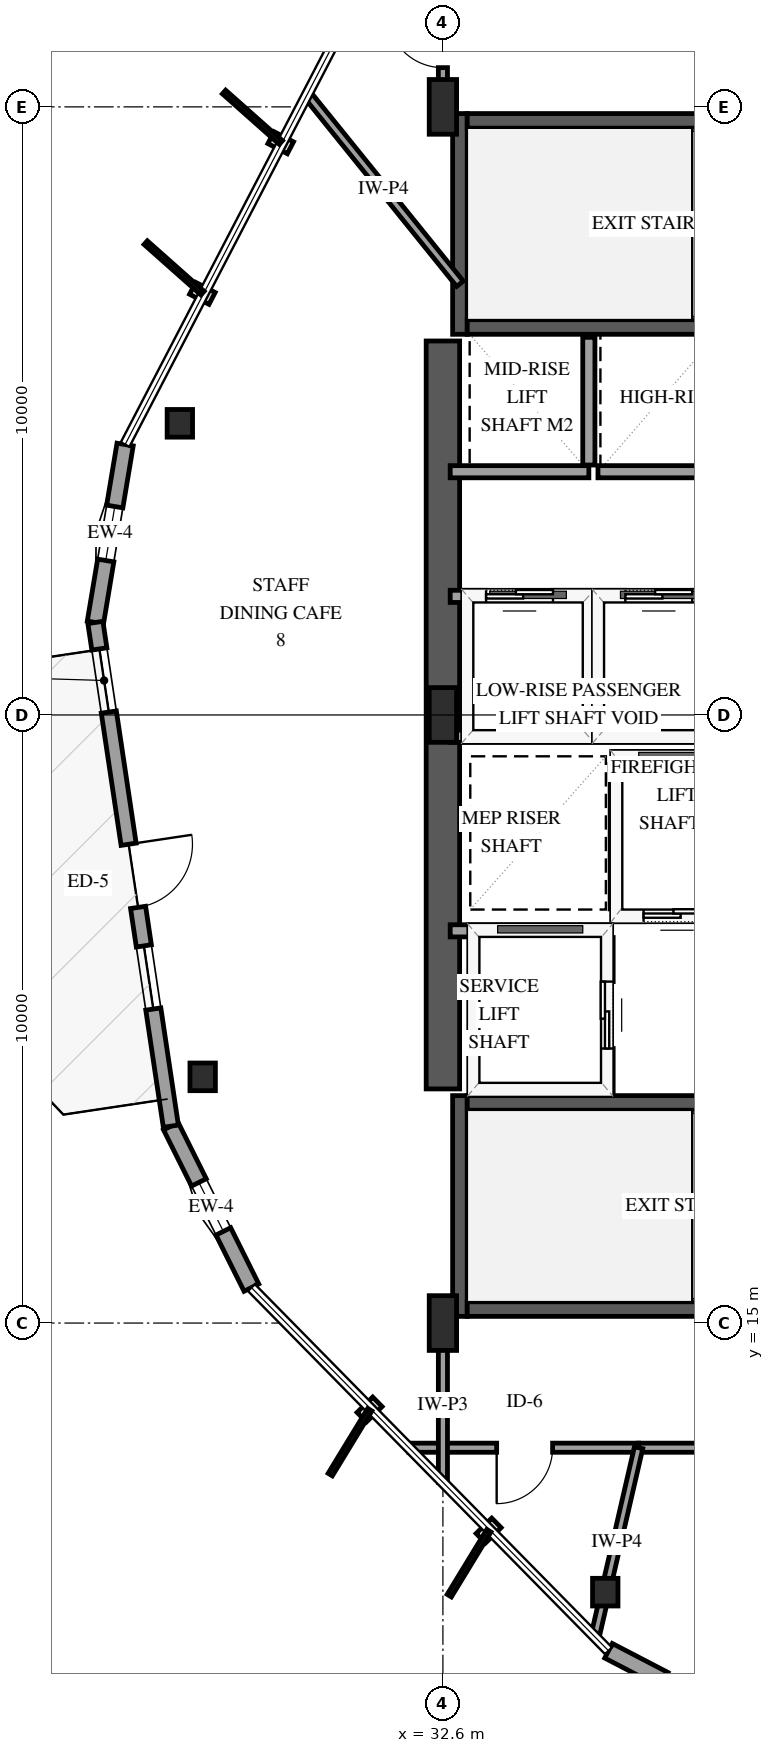
"""IFC4 building model, lengths in metres.
Left out: names, types, materials, properties, quantities, classifications, styles, units other than length and angle.
Written with IfcOpenShell. Run it as: python <this file> out.ifc"""

import sys

from ifc_helpers import new_model, si_unit, direction, frame, frame_2d, origin, origin_2d, place, context, subcontext, project, spatial, rectangle, i_section, extrude, element, fill, save


model = new_model("IFC4")
c1 = context("Model", 3, precision=1e-05, world=origin(), true_north=direction((0.0, 1.0)))
c2 = subcontext(c1, "Body", "Model", "MODEL_VIEW")
j1 = project(units=[si_unit("LENGTHUNIT", "METRE"), si_unit("PLANEANGLEUNIT", "RADIAN")], contexts=[c1])
p1 = place(None, origin())
s1 = spatial("IfcSite", under=j1, at=p1, CompositionType="ELEMENT")
p2 = place(p1, origin())
s2 = spatial("IfcBuilding", under=s1, at=p2, CompositionType="ELEMENT")
p3 = place(p2, frame((0.0, 0.0, 130.3)))
s3 = spatial("IfcBuildingStorey", under=s2, at=p3, CompositionType="ELEMENT", Elevation=130.3)
p4 = place(p3, frame((32.88, 15.11, 0.0), z_axis=(0.0, 0.0, 1.0), x_axis=(0.0, 1.0, 0.0)))
e1 = element("IfcWall", 1, at=p4, inside=s3, PredefinedType="SHEAR", context=c2, shape_type="SweptSolid", body=[
    extrude(rectangle(XDim=3.63, YDim=0.24, at=frame_2d((1.815, 0.0))), origin(), (0.0, 0.0, 1.0), 3.9),
])
for number, where, z_axis, x_axis in (
    (2, (33.0, 15.23, 0.0), (0.0, 0.0, 1.0), (1.0, 0.0, 0.0)),
    (3, (33.0, 18.62, 0.0), (0.0, 0.0, 1.0), (1.0, 0.0, 0.0)),
):
    element("IfcWall", number, at=place(p3, frame(where, z_axis=z_axis, x_axis=x_axis)), inside=s3, PredefinedType="SHEAR", context=c2, shape_type="SweptSolid", body=[
        extrude(rectangle(XDim=8.0, YDim=0.24, at=frame_2d((4.0, 0.0))), origin(), (0.0, 0.0, 1.0), 3.9),
    ])
p5 = place(p3, frame((32.88, 31.26, 0.0), z_axis=(0.0, 0.0, 1.0), x_axis=(0.0, 1.0, 0.0)))
e4 = element("IfcWall", 4, at=p5, inside=s3, PredefinedType="SHEAR", context=c2, shape_type="SweptSolid", body=[
    extrude(rectangle(XDim=3.63, YDim=0.24, at=frame_2d((1.815, 0.0))), origin(), (0.0, 0.0, 1.0), 3.9),
])
for number, where, z_axis, x_axis in (
    (5, (33.0, 31.38, 0.0), (0.0, 0.0, 1.0), (1.0, 0.0, 0.0)),
    (6, (33.0, 34.77, 0.0), (0.0, 0.0, 1.0), (1.0, 0.0, 0.0)),
):
    element("IfcWall", number, at=place(p3, frame(where, z_axis=z_axis, x_axis=x_axis)), inside=s3, PredefinedType="SHEAR", context=c2, shape_type="SweptSolid", body=[
        extrude(rectangle(XDim=8.0, YDim=0.24, at=frame_2d((4.0, 0.0))), origin(), (0.0, 0.0, 1.0), 3.9),
    ])
p6 = place(p3, frame((32.6, 18.85, 0.0), z_axis=(0.0, 0.0, 1.0), x_axis=(0.0, 1.0, 0.0)))
e7 = element("IfcWall", 7, at=p6, inside=s3, PredefinedType="SHEAR", context=c2, shape_type="SweptSolid", body=[
    extrude(rectangle(XDim=12.3, YDim=0.55, at=frame_2d((6.15, 0.0))), origin(), (0.0, 0.0, 1.0), 3.9),
])
for number, where, z_axis, x_axis in (
    (8, (32.6, 15.0, 0.0), (0.0, 0.0, 1.0), (1.0, 0.0, 0.0)),
    (9, (32.6, 25.0, 0.0), (0.0, 0.0, 1.0), (1.0, 0.0, 0.0)),
    (10, (32.6, 35.0, 0.0), (0.0, 0.0, 1.0), (1.0, 0.0, 0.0)),
):
    element("IfcColumn", number, at=place(p3, frame(where, z_axis=z_axis, x_axis=x_axis)), inside=s3, PredefinedType="PILASTER", context=c2, shape_type="SweptSolid", body=[
        extrude(rectangle(XDim=0.45, YDim=0.9, at=origin_2d()), origin(), (0.0, 0.0, 1.0), 3.9),
    ])
for number, where, z_axis, x_axis in (
    (11, (28.274, 29.796, 0.0), (0.0, 0.0, 1.0), (1.0, 0.0, 0.0)),
    (12, (28.649, 19.049, 0.0), (0.0, 0.0, 1.0), (1.0, 0.0, 0.0)),
    (13, (35.27, 10.575, 0.0), (0.0, 0.0, 1.0), (1.0, 0.0, 0.0)),
):
    element("IfcColumn", number, at=place(p3, frame(where, z_axis=z_axis, x_axis=x_axis)), inside=s3, PredefinedType="COLUMN", context=c2, shape_type="SweptSolid", body=[
        extrude(i_section(OverallWidth=0.418, OverallDepth=0.455, WebThickness=0.042, FlangeThickness=0.068, FilletRadius=0.038, at=origin_2d()), origin(), (0.0, 0.0, 1.0), 3.9),
    ])
p7 = place(p3, frame((27.374, 29.447, 0.0), z_axis=(0.0, 0.0, 1.0), x_axis=(-0.164759305297, -0.986333803191, 0.0)))
e14 = element("IfcWall", 14, at=p7, inside=s3, PredefinedType="SOLIDWALL", context=c2, shape_type="SweptSolid", body=[
    extrude(rectangle(XDim=2.967, YDim=0.27, at=frame_2d((1.483, 0.0))), origin(), (0.0, 0.0, 1.0), 2.939),
])
p8 = place(p7, frame((1.033, 0.0, 0.75)))
e15 = element("IfcOpeningElement", 15, at=p8, cuts=e14, PredefinedType="OPENING", context=c2, shape_type="SweptSolid", body=[
    extrude(rectangle(XDim=0.9, YDim=1.5, at=frame_2d((0.45, 0.75))), frame((0.0, 0.145, 0.0), z_axis=(0.0, -1.0, 0.0), x_axis=(1.0, 0.0, 0.0)), (0.0, 0.0, 1.0), 0.29),
])
p9 = place(p3, frame((28.126, 18.237, 0.0), z_axis=(0.0, 0.0, 1.0), x_axis=(0.446489189921, -0.894789027248, 0.0)))
e16 = element("IfcWall", 16, at=p9, inside=s3, PredefinedType="SOLIDWALL", context=c2, shape_type="SweptSolid", body=[
    extrude(rectangle(XDim=2.966, YDim=0.27, at=frame_2d((1.483, 0.0))), origin(), (0.0, 0.0, 1.0), 2.939),
])
p10 = place(p9, frame((1.033, 0.0, 0.75)))
e17 = element("IfcOpeningElement", 17, at=p10, cuts=e16, PredefinedType="OPENING", context=c2, shape_type="SweptSolid", body=[
    extrude(rectangle(XDim=0.9, YDim=1.5, at=frame_2d((0.45, 0.75))), frame((0.0, 0.145, 0.0), z_axis=(0.0, -1.0, 0.0), x_axis=(1.0, 0.0, 0.0)), (0.0, 0.0, 1.0), 0.29),
])
p11 = place(p3, frame((26.885, 26.521, 0.0), z_axis=(0.0, 0.0, 1.0), x_axis=(0.148183669797, -0.988959857631, 0.0)))
e18 = element("IfcWall", 18, at=p11, inside=s3, PredefinedType="SOLIDWALL", context=c2, shape_type="SweptSolid", body=[
    extrude(rectangle(XDim=8.376, YDim=0.25, at=frame_2d((4.188, 0.0))), origin(), (0.0, 0.0, 1.0), 2.939),
])
p12 = place(p11, frame((3.688, 0.0, 0.0)))
e19 = element("IfcOpeningElement", 19, at=p12, cuts=e18, PredefinedType="OPENING", context=c2, shape_type="SweptSolid", body=[
    extrude(rectangle(XDim=1.05, YDim=2.15, at=frame_2d((0.525, 1.075))), frame((0.0, 0.135, 0.0), z_axis=(0.0, -1.0, 0.0), x_axis=(1.0, 0.0, 0.0)), (0.0, 0.0, 1.0), 0.27),
])
p13 = place(p11, frame((0.44, 0.0, 0.72)))
e20 = element("IfcOpeningElement", 20, at=p13, cuts=e18, PredefinedType="OPENING", context=c2, shape_type="SweptSolid", body=[
    extrude(rectangle(XDim=1.05, YDim=1.55, at=frame_2d((0.525, 0.775))), frame((0.0, 0.135, 0.0), z_axis=(0.0, -1.0, 0.0), x_axis=(1.0, 0.0, 0.0)), (0.0, 0.0, 1.0), 0.27),
])
p14 = place(p11, frame((5.378, 0.0, 0.72)))
e21 = element("IfcOpeningElement", 21, at=p14, cuts=e18, PredefinedType="OPENING", context=c2, shape_type="SweptSolid", body=[
    extrude(rectangle(XDim=1.05, YDim=1.55, at=frame_2d((0.525, 0.775))), frame((0.0, 0.135, 0.0), z_axis=(0.0, -1.0, 0.0), x_axis=(1.0, 0.0, 0.0)), (0.0, 0.0, 1.0), 0.27),
])
p15 = place(p3, frame((35.324, 9.611, 0.0), z_axis=(0.0, 0.0, 1.0), x_axis=(0.887169636056, -0.461443427585, 0.0)))
e22 = element("IfcWall", 22, at=p15, inside=s3, PredefinedType="SOLIDWALL", context=c2, shape_type="SweptSolid", body=[
    extrude(rectangle(XDim=2.967, YDim=0.27, at=frame_2d((1.483, 0.0))), origin(), (0.0, 0.0, 1.0), 2.939),
])
p16 = place(p15, frame((1.033, 0.0, 0.75)))
e23 = element("IfcOpeningElement", 23, at=p16, cuts=e22, PredefinedType="OPENING", context=c2, shape_type="SweptSolid", body=[
    extrude(rectangle(XDim=0.9, YDim=1.5, at=frame_2d((0.45, 0.75))), frame((0.0, 0.145, 0.0), z_axis=(0.0, -1.0, 0.0), x_axis=(1.0, 0.0, 0.0)), (0.0, 0.0, 1.0), 0.29),
])
p17 = place(p3, frame((35.45, 21.7, 0.0), z_axis=(0.0, 0.0, 1.0), x_axis=(1.0, 0.0, 0.0)))
e24 = element("IfcWall", 24, at=p17, inside=s3, PredefinedType="SOLIDWALL", context=c2, shape_type="SweptSolid", body=[
    extrude(rectangle(XDim=2.0, YDim=0.2, at=frame_2d((1.0, 0.0))), origin(), (0.0, 0.0, 1.0), 3.56),
])
p18 = place(p17, frame((0.45, 0.0, 0.0)))
e25 = element("IfcOpeningElement", 25, at=p18, cuts=e24, PredefinedType="OPENING", context=c2, shape_type="SweptSolid", body=[
    extrude(rectangle(XDim=1.1, YDim=2.15, at=frame_2d((0.55, 1.075))), frame((0.0, 0.11, 0.0), z_axis=(0.0, -1.0, 0.0), x_axis=(1.0, 0.0, 0.0)), (0.0, 0.0, 1.0), 0.22),
])
p19 = place(p3, frame((35.45, 24.3, 0.0), z_axis=(0.0, 0.0, 1.0), x_axis=(1.0, 0.0, 0.0)))
e26 = element("IfcWall", 26, at=p19, inside=s3, PredefinedType="SOLIDWALL", context=c2, shape_type="SweptSolid", body=[
    extrude(rectangle(XDim=2.0, YDim=0.2, at=frame_2d((1.0, 0.0))), origin(), (0.0, 0.0, 1.0), 3.56),
])
p20 = place(p3, frame((35.45, 21.81, 0.0), z_axis=(0.0, 0.0, 1.0), x_axis=(0.0, 1.0, 0.0)))
e27 = element("IfcWall", 27, at=p20, inside=s3, PredefinedType="SOLIDWALL", context=c2, shape_type="SweptSolid", body=[
    extrude(rectangle(XDim=2.38, YDim=0.2, at=frame_2d((1.19, 0.0))), origin(), (0.0, 0.0, 1.0), 3.56),
])
p21 = place(p3, frame((32.72, 21.45, 0.0), z_axis=(0.0, 0.0, 1.0), x_axis=(1.0, 0.0, 0.0)))
e28 = element("IfcWall", 28, at=p21, inside=s3, PredefinedType="SOLIDWALL", context=c2, shape_type="SweptSolid", body=[
    extrude(rectangle(XDim=2.58, YDim=0.2, at=frame_2d((1.29, 0.0))), origin(), (0.0, 0.0, 1.0), 3.56),
])
p22 = place(p3, frame((35.3, 18.79, 0.0), z_axis=(0.0, 0.0, 1.0), x_axis=(0.0, 1.0, 0.0)))
e29 = element("IfcWall", 29, at=p22, inside=s3, PredefinedType="SOLIDWALL", context=c2, shape_type="SweptSolid", body=[
    extrude(rectangle(XDim=2.55, YDim=0.2, at=frame_2d((1.275, 0.0))), origin(), (0.0, 0.0, 1.0), 3.56),
])
p23 = place(p22, frame((0.725, 0.0, 0.0)))
e30 = element("IfcOpeningElement", 30, at=p23, cuts=e29, PredefinedType="OPENING", context=c2, shape_type="SweptSolid", body=[
    extrude(rectangle(XDim=1.1, YDim=2.15, at=frame_2d((0.55, 1.075))), frame((0.0, 0.11, 0.0), z_axis=(0.0, -1.0, 0.0), x_axis=(1.0, 0.0, 0.0)), (0.0, 0.0, 1.0), 0.22),
])
p24 = place(p3, frame((32.72, 24.65, 0.0), z_axis=(0.0, 0.0, 1.0), x_axis=(1.0, 0.0, 0.0)))
e31 = element("IfcWall", 31, at=p24, inside=s3, PredefinedType="SOLIDWALL", context=c2, shape_type="SweptSolid", body=[
    extrude(rectangle(XDim=2.28, YDim=0.2, at=frame_2d((1.14, 0.0))), origin(), (0.0, 0.0, 1.0), 3.56),
])
p25 = place(p3, frame((32.72, 26.95, 0.0), z_axis=(0.0, 0.0, 1.0), x_axis=(1.0, 0.0, 0.0)))
e32 = element("IfcWall", 32, at=p25, inside=s3, PredefinedType="SOLIDWALL", context=c2, shape_type="SweptSolid", body=[
    extrude(rectangle(XDim=2.28, YDim=0.2, at=frame_2d((1.14, 0.0))), origin(), (0.0, 0.0, 1.0), 3.56),
])
p26 = place(p25, frame((0.59, 0.0, 0.0)))
e33 = element("IfcOpeningElement", 33, at=p26, cuts=e32, PredefinedType="OPENING", context=c2, shape_type="SweptSolid", body=[
    extrude(rectangle(XDim=1.1, YDim=2.15, at=frame_2d((0.55, 1.075))), frame((0.0, 0.11, 0.0), z_axis=(0.0, -1.0, 0.0), x_axis=(1.0, 0.0, 0.0)), (0.0, 0.0, 1.0), 0.22),
])
p27 = place(p3, frame((35.0, 24.76, 0.0), z_axis=(0.0, 0.0, 1.0), x_axis=(0.0, 1.0, 0.0)))
e34 = element("IfcWall", 34, at=p27, inside=s3, PredefinedType="SOLIDWALL", context=c2, shape_type="SweptSolid", body=[
    extrude(rectangle(XDim=2.08, YDim=0.2, at=frame_2d((1.04, 0.0))), origin(), (0.0, 0.0, 1.0), 3.56),
])
p28 = place(p3, frame((35.15, 24.65, 0.0), z_axis=(0.0, 0.0, 1.0), x_axis=(1.0, 0.0, 0.0)))
e35 = element("IfcWall", 35, at=p28, inside=s3, PredefinedType="SOLIDWALL", context=c2, shape_type="SweptSolid", body=[
    extrude(rectangle(XDim=2.0, YDim=0.2, at=frame_2d((1.0, 0.0))), origin(), (0.0, 0.0, 1.0), 3.56),
])
p29 = place(p3, frame((35.15, 26.95, 0.0), z_axis=(0.0, 0.0, 1.0), x_axis=(1.0, 0.0, 0.0)))
e36 = element("IfcWall", 36, at=p29, inside=s3, PredefinedType="SOLIDWALL", context=c2, shape_type="SweptSolid", body=[
    extrude(rectangle(XDim=2.0, YDim=0.2, at=frame_2d((1.0, 0.0))), origin(), (0.0, 0.0, 1.0), 3.56),
])
p30 = place(p29, frame((0.45, 0.0, 0.0)))
e37 = element("IfcOpeningElement", 37, at=p30, cuts=e36, PredefinedType="OPENING", context=c2, shape_type="SweptSolid", body=[
    extrude(rectangle(XDim=1.1, YDim=2.15, at=frame_2d((0.55, 1.075))), frame((0.0, 0.11, 0.0), z_axis=(0.0, -1.0, 0.0), x_axis=(1.0, 0.0, 0.0)), (0.0, 0.0, 1.0), 0.22),
])
p31 = place(p3, frame((32.72, 29.0, 0.0), z_axis=(0.0, 0.0, 1.0), x_axis=(1.0, 0.0, 0.0)))
e38 = element("IfcWall", 38, at=p31, inside=s3, PredefinedType="SOLIDWALL", context=c2, shape_type="SweptSolid", body=[
    extrude(rectangle(XDim=2.28, YDim=0.2, at=frame_2d((1.14, 0.0))), origin(), (0.0, 0.0, 1.0), 3.56),
])
p32 = place(p3, frame((35.0, 29.11, 0.0), z_axis=(0.0, 0.0, 1.0), x_axis=(0.0, 1.0, 0.0)))
e39 = element("IfcWall", 39, at=p32, inside=s3, PredefinedType="SOLIDWALL", context=c2, shape_type="SweptSolid", body=[
    extrude(rectangle(XDim=2.1, YDim=0.2, at=frame_2d((1.05, 0.0))), origin(), (0.0, 0.0, 1.0), 3.56),
])
p33 = place(p3, frame((35.15, 29.0, 0.0), z_axis=(0.0, 0.0, 1.0), x_axis=(1.0, 0.0, 0.0)))
e40 = element("IfcWall", 40, at=p33, inside=s3, PredefinedType="SOLIDWALL", context=c2, shape_type="SweptSolid", body=[
    extrude(rectangle(XDim=2.0, YDim=0.2, at=frame_2d((1.0, 0.0))), origin(), (0.0, 0.0, 1.0), 3.56),
])
p34 = place(p3, frame((43.455, 12.95, 0.0), z_axis=(0.0, 0.0, 1.0), x_axis=(-1.0, 0.0, 0.0)))
e41 = element("IfcWall", 41, at=p34, inside=s3, PredefinedType="PARTITIONING", context=c2, shape_type="SweptSolid", body=[
    extrude(rectangle(XDim=7.637, YDim=0.15, at=frame_2d((3.818, 0.0))), origin(), (0.0, 0.0, 1.0), 3.56),
])
p35 = place(p34, frame((3.344, 0.0, 0.0)))
e42 = element("IfcOpeningElement", 42, at=p35, cuts=e41, PredefinedType="OPENING", context=c2, shape_type="SweptSolid", body=[
    extrude(rectangle(XDim=0.92, YDim=2.12, at=frame_2d((0.46, 1.06))), frame((0.0, 0.085, 0.0), z_axis=(0.0, -1.0, 0.0), x_axis=(1.0, 0.0, 0.0)), (0.0, 0.0, 1.0), 0.17),
])
p36 = place(p3, frame((32.88, 32.091, 0.0), z_axis=(0.0, 0.0, 1.0), x_axis=(-0.627971930716, 0.77823598878, 0.0)))
e43 = element("IfcWall", 43, at=p36, inside=s3, PredefinedType="PARTITIONING", context=c2, shape_type="SweptSolid", body=[
    extrude(rectangle(XDim=4.0, YDim=0.14, at=frame_2d((2.0, 0.0))), origin(), (0.0, 0.0, 1.0), 3.56),
])
p37 = place(p3, frame((35.818, 12.95, 0.0), z_axis=(0.0, 0.0, 1.0), x_axis=(-1.0, 0.0, 0.0)))
e44 = element("IfcWall", 44, at=p37, inside=s3, PredefinedType="PARTITIONING", context=c2, shape_type="SweptSolid", body=[
    extrude(rectangle(XDim=3.778, YDim=0.15, at=frame_2d((1.889, 0.0))), origin(), (0.0, 0.0, 1.0), 3.56),
])
p38 = place(p37, frame((1.414, 0.0, 0.0)))
e45 = element("IfcOpeningElement", 45, at=p38, cuts=e44, PredefinedType="OPENING", context=c2, shape_type="SweptSolid", body=[
    extrude(rectangle(XDim=0.92, YDim=2.12, at=frame_2d((0.46, 1.06))), frame((0.0, 0.085, 0.0), z_axis=(0.0, -1.0, 0.0), x_axis=(1.0, 0.0, 0.0)), (0.0, 0.0, 1.0), 0.17),
])
p39 = place(p3, frame((35.818, 12.95, 0.0), z_axis=(0.0, 0.0, 1.0), x_axis=(-0.224814843935, -0.974401501408, 0.0)))
e46 = element("IfcWall", 46, at=p39, inside=s3, PredefinedType="PARTITIONING", context=c2, shape_type="SweptSolid", body=[
    extrude(rectangle(XDim=3.194, YDim=0.14, at=frame_2d((1.597, 0.0))), origin(), (0.0, 0.0, 1.0), 2.855),
])
p40 = place(p3, frame((32.6, 12.38, 0.0), z_axis=(0.0, 0.0, 1.0), x_axis=(0.0, 1.0, 0.0)))
e47 = element("IfcWall", 47, at=p40, inside=s3, PredefinedType="PARTITIONING", context=c2, shape_type="SweptSolid", body=[
    extrude(rectangle(XDim=2.55, YDim=0.15, at=frame_2d((1.275, 0.0))), origin(), (0.0, 0.0, 1.0), 3.56),
])
p41 = place(p3, frame((32.6, 35.07, 0.0), z_axis=(0.0, 0.0, 1.0), x_axis=(0.0, 1.0, 0.0)))
e48 = element("IfcWall", 48, at=p41, inside=s3, PredefinedType="PARTITIONING", context=c2, shape_type="SweptSolid", body=[
    extrude(rectangle(XDim=1.91, YDim=0.15, at=frame_2d((0.955, 0.0))), origin(), (0.0, 0.0, 1.0), 3.56),
])
p42 = place(p41, frame((0.575, 0.0, 0.0)))
e49 = element("IfcOpeningElement", 49, at=p42, cuts=e48, PredefinedType="OPENING", context=c2, shape_type="SweptSolid", body=[
    extrude(rectangle(XDim=0.92, YDim=2.12, at=frame_2d((0.46, 1.06))), frame((0.0, 0.085, 0.0), z_axis=(0.0, -1.0, 0.0), x_axis=(1.0, 0.0, 0.0)), (0.0, 0.0, 1.0), 0.17),
])
p43 = place(p8, origin())
e50 = element("IfcWindow", 50, at=p43, inside=s3, PartitioningType="SINGLE_PANEL", PredefinedType="WINDOW", context=c2, shape_type="SweptSolid", body=[
    extrude(rectangle(XDim=0.9, YDim=1.5, at=frame_2d((0.45, 0.75))), frame((0.0, 0.03, 0.0), z_axis=(0.0, -1.0, 0.0), x_axis=(1.0, 0.0, 0.0)), (0.0, 0.0, 1.0), 0.06),
])
fill(e15, e50)
p44 = place(p10, origin())
e51 = element("IfcWindow", 51, at=p44, inside=s3, PartitioningType="SINGLE_PANEL", PredefinedType="WINDOW", context=c2, shape_type="SweptSolid", body=[
    extrude(rectangle(XDim=0.9, YDim=1.5, at=frame_2d((0.45, 0.75))), frame((0.0, 0.03, 0.0), z_axis=(0.0, -1.0, 0.0), x_axis=(1.0, 0.0, 0.0)), (0.0, 0.0, 1.0), 0.06),
])
fill(e17, e51)
p45 = place(p12, origin())
e52 = element("IfcDoor", 52, at=p45, inside=s3, OperationType="SINGLE_SWING_LEFT", PredefinedType="DOOR", context=c2, shape_type="SweptSolid", body=[
    extrude(rectangle(XDim=1.05, YDim=2.15, at=frame_2d((0.525, 1.075))), frame((0.0, 0.025, 0.0), z_axis=(0.0, -1.0, 0.0), x_axis=(1.0, 0.0, 0.0)), (0.0, 0.0, 1.0), 0.05),
])
fill(e19, e52)
p46 = place(p13, origin())
e53 = element("IfcWindow", 53, at=p46, inside=s3, PartitioningType="SINGLE_PANEL", PredefinedType="WINDOW", context=c2, shape_type="SweptSolid", body=[
    extrude(rectangle(XDim=1.05, YDim=1.55, at=frame_2d((0.525, 0.775))), frame((0.0, 0.03, 0.0), z_axis=(0.0, -1.0, 0.0), x_axis=(1.0, 0.0, 0.0)), (0.0, 0.0, 1.0), 0.06),
])
fill(e20, e53)
p47 = place(p14, origin())
e54 = element("IfcWindow", 54, at=p47, inside=s3, PartitioningType="SINGLE_PANEL", PredefinedType="WINDOW", context=c2, shape_type="SweptSolid", body=[
    extrude(rectangle(XDim=1.05, YDim=1.55, at=frame_2d((0.525, 0.775))), frame((0.0, 0.03, 0.0), z_axis=(0.0, -1.0, 0.0), x_axis=(1.0, 0.0, 0.0)), (0.0, 0.0, 1.0), 0.06),
])
fill(e21, e54)
p48 = place(p18, origin())
e55 = element("IfcDoor", 55, at=p48, inside=s3, OperationType="SLIDING_TO_LEFT", PredefinedType="DOOR", context=c2, shape_type="SweptSolid", body=[
    extrude(rectangle(XDim=1.1, YDim=2.15, at=frame_2d((0.55, 1.075))), frame((0.0, 0.025, 0.0), z_axis=(0.0, -1.0, 0.0), x_axis=(1.0, 0.0, 0.0)), (0.0, 0.0, 1.0), 0.05),
])
fill(e25, e55)
p49 = place(p23, origin())
e56 = element("IfcDoor", 56, at=p49, inside=s3, OperationType="SLIDING_TO_LEFT", PredefinedType="DOOR", context=c2, shape_type="SweptSolid", body=[
    extrude(rectangle(XDim=1.1, YDim=2.15, at=frame_2d((0.55, 1.075))), frame((0.0, 0.025, 0.0), z_axis=(0.0, -1.0, 0.0), x_axis=(1.0, 0.0, 0.0)), (0.0, 0.0, 1.0), 0.05),
])
fill(e30, e56)
p50 = place(p26, origin())
e57 = element("IfcDoor", 57, at=p50, inside=s3, OperationType="SLIDING_TO_LEFT", PredefinedType="DOOR", context=c2, shape_type="SweptSolid", body=[
    extrude(rectangle(XDim=1.1, YDim=2.15, at=frame_2d((0.55, 1.075))), frame((0.0, 0.025, 0.0), z_axis=(0.0, -1.0, 0.0), x_axis=(1.0, 0.0, 0.0)), (0.0, 0.0, 1.0), 0.05),
])
fill(e33, e57)
p51 = place(p30, origin())
e58 = element("IfcDoor", 58, at=p51, inside=s3, OperationType="SLIDING_TO_LEFT", PredefinedType="DOOR", context=c2, shape_type="SweptSolid", body=[
    extrude(rectangle(XDim=1.1, YDim=2.15, at=frame_2d((0.55, 1.075))), frame((0.0, 0.025, 0.0), z_axis=(0.0, -1.0, 0.0), x_axis=(1.0, 0.0, 0.0)), (0.0, 0.0, 1.0), 0.05),
])
fill(e37, e58)
p52 = place(p38, origin())
e59 = element("IfcDoor", 59, at=p52, inside=s3, OperationType="SINGLE_SWING_RIGHT", PredefinedType="DOOR", context=c2, shape_type="SweptSolid", body=[
    extrude(rectangle(XDim=0.92, YDim=2.12, at=frame_2d((0.46, 1.06))), frame((0.0, 0.025, 0.0), z_axis=(0.0, -1.0, 0.0), x_axis=(1.0, 0.0, 0.0)), (0.0, 0.0, 1.0), 0.05),
])
fill(e45, e59)
p53 = place(p42, origin())
e60 = element("IfcDoor", 60, at=p53, inside=s3, OperationType="SINGLE_SWING_RIGHT", PredefinedType="DOOR", context=c2, shape_type="SweptSolid", body=[
    extrude(rectangle(XDim=0.92, YDim=2.12, at=frame_2d((0.46, 1.06))), frame((0.0, 0.025, 0.0), z_axis=(0.0, -1.0, 0.0), x_axis=(1.0, 0.0, 0.0)), (0.0, 0.0, 1.0), 0.05),
])
fill(e49, e60)
save(model, sys.argv[1])
